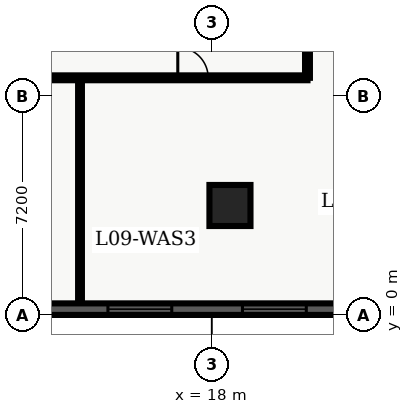
"""IFC4 building model, lengths in metres.
Left out: names, types, materials, properties, quantities, classifications, styles, units other than length and angle.
Written with IfcOpenShell. Run it as: python <this file> out.ifc"""

import sys

from ifc_helpers import new_model, entity, si_unit, converted_unit, direction, frame, origin_with_axes, origin_2d_with_axis, place, context, subcontext, project, spatial, polyline, rectangle, outline, extrude, element, fill, save


model = new_model("IFC4")
c1 = context("Model", 3, precision=1e-05, world=origin_with_axes(), true_north=direction((0.0, 1.0)))
c2 = subcontext(c1, "Body", "Model", "MODEL_VIEW")
j1 = project(units=[si_unit("LENGTHUNIT", "METRE"), converted_unit("PLANEANGLEUNIT", "DEGREE", entity("IfcPlaneAngleMeasure", 0.017), si_unit("PLANEANGLEUNIT", "RADIAN"), dimensions=[0, 0, 0, 0, 0, 0, 0])], contexts=[c1])
p1 = place(None, origin_with_axes())
s1 = spatial("IfcSite", under=j1, at=p1, CompositionType="ELEMENT")
p2 = place(p1, origin_with_axes())
s2 = spatial("IfcBuilding", under=s1, at=p2, CompositionType="ELEMENT")
p3 = place(p2, frame((0.0, 0.0, 40.5), z_axis=(0.0, 0.0, 1.0), x_axis=(1.0, 0.0, 0.0)))
s3 = spatial("IfcBuildingStorey", under=s2, at=p3, CompositionType="ELEMENT", Elevation=40.5)
p4 = place(p3, frame((18.6, 3.6, 0.0), z_axis=(0.0, 0.0, 1.0), x_axis=(1.0, 0.0, 0.0)))
e1 = element("IfcColumn", 1, at=p4, inside=s3, PredefinedType="COLUMN", context=c2, shape_type="SweptSolid", body=[
    extrude(rectangle(XDim=1.35, YDim=1.35, at=origin_2d_with_axis()), origin_with_axes(), (0.0, 0.0, 1.0), 3.9),
])
p5 = place(p3, frame((2.6, 7.8, 0.0), z_axis=(0.0, 0.0, 1.0), x_axis=(1.0, 0.0, 0.0)))
e2 = element("IfcWall", 2, at=p5, inside=s3, PredefinedType="PARTITIONING", context=c2, shape_type="SweptSolid", body=[
    extrude(outline(polyline([(0.0, -0.08), (18.55, -0.08), (18.55, 0.08), (0.0, 0.08), (0.0, -0.08)])), origin_with_axes(), (0.0, 0.0, 1.0), 2.7),
])
p6 = place(p5, frame((2.225, 0.0, 0.0), z_axis=(0.0, 0.0, 1.0), x_axis=(1.0, 0.0, 0.0)))
e3 = element("IfcOpeningElement", 3, at=p6, cuts=e2, PredefinedType="OPENING", context=c2, shape_type="SweptSolid", body=[
    extrude(rectangle(XDim=1.0, YDim=0.18, at=origin_2d_with_axis()), origin_with_axes(), (0.0, 0.0, 1.0), 2.15),
])
p7 = place(p5, frame((8.043, 0.0, 0.0), z_axis=(0.0, 0.0, 1.0), x_axis=(1.0, 0.0, 0.0)))
e4 = element("IfcOpeningElement", 4, at=p7, cuts=e2, PredefinedType="OPENING", context=c2, shape_type="SweptSolid", body=[
    extrude(rectangle(XDim=1.0, YDim=0.18, at=origin_2d_with_axis()), origin_with_axes(), (0.0, 0.0, 1.0), 2.15),
])
p8 = place(p5, frame((14.784, 0.0, 0.0), z_axis=(0.0, 0.0, 1.0), x_axis=(1.0, 0.0, 0.0)))
e5 = element("IfcOpeningElement", 5, at=p8, cuts=e2, PredefinedType="OPENING", context=c2, shape_type="SweptSolid", body=[
    extrude(rectangle(XDim=1.0, YDim=0.18, at=origin_2d_with_axis()), origin_with_axes(), (0.0, 0.0, 1.0), 2.15),
])
p9 = place(p3, frame((21.15, 7.8, 0.0), z_axis=(0.0, 0.0, 1.0), x_axis=(0.0, 1.0, 0.0)))
e6 = element("IfcWall", 6, at=p9, inside=s3, PredefinedType="PARTITIONING", context=c2, shape_type="SweptSolid", body=[
    extrude(outline(polyline([(0.0, -0.08), (32.7, -0.08), (32.7, 0.08), (0.0, 0.08), (0.0, -0.08)])), origin_with_axes(), (0.0, 0.0, 1.0), 2.7),
])
p10 = place(p9, frame((5.475, 0.0, 0.0), z_axis=(0.0, 0.0, 1.0), x_axis=(1.0, 0.0, 0.0)))
e7 = element("IfcOpeningElement", 7, at=p10, cuts=e6, PredefinedType="OPENING", context=c2, shape_type="SweptSolid", body=[
    extrude(rectangle(XDim=1.05, YDim=0.18, at=origin_2d_with_axis()), origin_with_axes(), (0.0, 0.0, 1.0), 2.15),
])
p11 = place(p3, frame((13.668, 0.36, 0.0), z_axis=(0.0, 0.0, 1.0), x_axis=(0.0, 1.0, 0.0)))
e8 = element("IfcWall", 8, at=p11, inside=s3, PredefinedType="PARTITIONING", context=c2, shape_type="SweptSolid", body=[
    extrude(outline(polyline([(0.0, -0.062), (7.34, -0.062), (7.34, 0.062), (0.0, 0.062), (0.0, -0.062)])), origin_with_axes(), (0.0, 0.0, 1.0), 2.7),
])
p12 = place(p3, frame((57.22, 0.19, 0.0), z_axis=(0.0, 0.0, 1.0), x_axis=(-1.0, 0.0, 0.0)))
e9 = element("IfcWall", 9, at=p12, inside=s3, PredefinedType="SOLIDWALL", context=c2, shape_type="SweptSolid", body=[
    extrude(outline(polyline([(0.0, -0.19), (54.82, -0.19), (54.82, 0.19), (0.0, 0.19), (0.0, -0.19)])), origin_with_axes(), (0.0, 0.0, 1.0), 3.66),
])
p13 = place(p12, frame((3.037, 0.0, 0.45), z_axis=(0.0, 0.0, 1.0), x_axis=(1.0, 0.0, 0.0)))
e10 = element("IfcOpeningElement", 10, at=p13, cuts=e9, PredefinedType="OPENING", context=c2, shape_type="SweptSolid", body=[
    extrude(rectangle(XDim=2.1, YDim=0.4, at=origin_2d_with_axis()), origin_with_axes(), (0.0, 0.0, 1.0), 2.2),
])
p14 = place(p12, frame((7.912, 0.0, 0.45), z_axis=(0.0, 0.0, 1.0), x_axis=(1.0, 0.0, 0.0)))
e11 = element("IfcOpeningElement", 11, at=p14, cuts=e9, PredefinedType="OPENING", context=c2, shape_type="SweptSolid", body=[
    extrude(rectangle(XDim=2.1, YDim=0.4, at=origin_2d_with_axis()), origin_with_axes(), (0.0, 0.0, 1.0), 2.2),
])
p15 = place(p12, frame((12.786, 0.0, 0.45), z_axis=(0.0, 0.0, 1.0), x_axis=(1.0, 0.0, 0.0)))
e12 = element("IfcOpeningElement", 12, at=p15, cuts=e9, PredefinedType="OPENING", context=c2, shape_type="SweptSolid", body=[
    extrude(rectangle(XDim=2.1, YDim=0.4, at=origin_2d_with_axis()), origin_with_axes(), (0.0, 0.0, 1.0), 2.2),
])
p16 = place(p12, frame((17.661, 0.0, 0.45), z_axis=(0.0, 0.0, 1.0), x_axis=(1.0, 0.0, 0.0)))
e13 = element("IfcOpeningElement", 13, at=p16, cuts=e9, PredefinedType="OPENING", context=c2, shape_type="SweptSolid", body=[
    extrude(rectangle(XDim=2.1, YDim=0.4, at=origin_2d_with_axis()), origin_with_axes(), (0.0, 0.0, 1.0), 2.2),
])
p17 = place(p12, frame((22.535, 0.0, 0.45), z_axis=(0.0, 0.0, 1.0), x_axis=(1.0, 0.0, 0.0)))
e14 = element("IfcOpeningElement", 14, at=p17, cuts=e9, PredefinedType="OPENING", context=c2, shape_type="SweptSolid", body=[
    extrude(rectangle(XDim=2.1, YDim=0.4, at=origin_2d_with_axis()), origin_with_axes(), (0.0, 0.0, 1.0), 2.2),
])
p18 = place(p12, frame((27.41, 0.0, 0.45), z_axis=(0.0, 0.0, 1.0), x_axis=(1.0, 0.0, 0.0)))
e15 = element("IfcOpeningElement", 15, at=p18, cuts=e9, PredefinedType="OPENING", context=c2, shape_type="SweptSolid", body=[
    extrude(rectangle(XDim=2.1, YDim=0.4, at=origin_2d_with_axis()), origin_with_axes(), (0.0, 0.0, 1.0), 2.2),
])
p19 = place(p12, frame((32.285, 0.0, 0.45), z_axis=(0.0, 0.0, 1.0), x_axis=(1.0, 0.0, 0.0)))
e16 = element("IfcOpeningElement", 16, at=p19, cuts=e9, PredefinedType="OPENING", context=c2, shape_type="SweptSolid", body=[
    extrude(rectangle(XDim=2.1, YDim=0.4, at=origin_2d_with_axis()), origin_with_axes(), (0.0, 0.0, 1.0), 2.2),
])
p20 = place(p12, frame((37.159, 0.0, 0.45), z_axis=(0.0, 0.0, 1.0), x_axis=(1.0, 0.0, 0.0)))
e17 = element("IfcOpeningElement", 17, at=p20, cuts=e9, PredefinedType="OPENING", context=c2, shape_type="SweptSolid", body=[
    extrude(rectangle(XDim=2.1, YDim=0.4, at=origin_2d_with_axis()), origin_with_axes(), (0.0, 0.0, 1.0), 2.2),
])
p21 = place(p12, frame((41.584, 0.0, 0.45), z_axis=(0.0, 0.0, 1.0), x_axis=(1.0, 0.0, 0.0)))
e18 = element("IfcOpeningElement", 18, at=p21, cuts=e9, PredefinedType="OPENING", context=c2, shape_type="SweptSolid", body=[
    extrude(rectangle(XDim=2.1, YDim=0.4, at=origin_2d_with_axis()), origin_with_axes(), (0.0, 0.0, 1.0), 2.2),
])
p22 = place(p12, frame((46.908, 0.0, 0.45), z_axis=(0.0, 0.0, 1.0), x_axis=(1.0, 0.0, 0.0)))
e19 = element("IfcOpeningElement", 19, at=p22, cuts=e9, PredefinedType="OPENING", context=c2, shape_type="SweptSolid", body=[
    extrude(rectangle(XDim=2.1, YDim=0.4, at=origin_2d_with_axis()), origin_with_axes(), (0.0, 0.0, 1.0), 2.2),
])
p23 = place(p12, frame((51.783, 0.0, 0.45), z_axis=(0.0, 0.0, 1.0), x_axis=(1.0, 0.0, 0.0)))
e20 = element("IfcOpeningElement", 20, at=p23, cuts=e9, PredefinedType="OPENING", context=c2, shape_type="SweptSolid", body=[
    extrude(rectangle(XDim=2.1, YDim=0.4, at=origin_2d_with_axis()), origin_with_axes(), (0.0, 0.0, 1.0), 2.2),
])
p24 = place(p5, frame((14.784, 0.0, 0.0), z_axis=(0.0, 0.0, 1.0), x_axis=(1.0, 0.0, 0.0)))
e21 = element("IfcDoor", 21, at=p24, inside=s3, OperationType="SINGLE_SWING_LEFT", PredefinedType="DOOR", context=c2, shape_type="SweptSolid", body=[
    extrude(rectangle(XDim=1.0, YDim=0.09, at=origin_2d_with_axis()), origin_with_axes(), (0.0, 0.0, 1.0), 2.15),
])
fill(e5, e21)
p25 = place(p12, frame((37.159, 0.0, 0.45), z_axis=(0.0, 0.0, 1.0), x_axis=(1.0, 0.0, 0.0)))
e22 = element("IfcWindow", 22, at=p25, inside=s3, PredefinedType="WINDOW", context=c2, shape_type="SweptSolid", body=[
    extrude(rectangle(XDim=2.1, YDim=0.09, at=origin_2d_with_axis()), origin_with_axes(), (0.0, 0.0, 1.0), 2.2),
])
fill(e17, e22)
p26 = place(p12, frame((41.584, 0.0, 0.45), z_axis=(0.0, 0.0, 1.0), x_axis=(1.0, 0.0, 0.0)))
e23 = element("IfcWindow", 23, at=p26, inside=s3, PredefinedType="WINDOW", context=c2, shape_type="SweptSolid", body=[
    extrude(rectangle(XDim=2.1, YDim=0.09, at=origin_2d_with_axis()), origin_with_axes(), (0.0, 0.0, 1.0), 2.2),
])
fill(e18, e23)
save(model, sys.argv[1])
